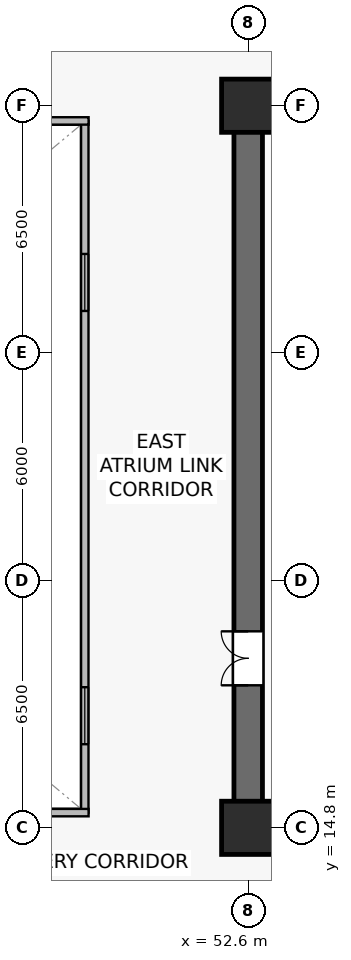
"""IFC4 building model, lengths in metres.
Left out: names, types, materials, properties, quantities, classifications, styles, units other than length and angle.
Written with IfcOpenShell. Run it as: python <this file> out.ifc"""

import sys

from ifc_helpers import new_model, si_unit, direction, frame, frame_2d, origin, origin_2d, place, context, subcontext, project, spatial, rectangle, extrude, source, transform, mapped, element, fill, save


model = new_model("IFC4")
c1 = context("Model", 3, precision=1e-05, world=origin(), true_north=direction((0.0, 1.0)))
c2 = subcontext(c1, "Body", "Model", "MODEL_VIEW")
j1 = project(units=[si_unit("LENGTHUNIT", "METRE"), si_unit("PLANEANGLEUNIT", "RADIAN")], contexts=[c1])
p1 = place(None, origin())
s1 = spatial("IfcSite", under=j1, at=p1, CompositionType="ELEMENT")
p2 = place(p1, origin())
s2 = spatial("IfcBuilding", under=s1, at=p2, CompositionType="ELEMENT")
p3 = place(p2, frame((0.0, 0.0, 90.8)))
s3 = spatial("IfcBuildingStorey", under=s2, at=p3, CompositionType="ELEMENT", Elevation=90.8)
p4 = place(p3, frame((52.225, 14.8, 0.0), z_axis=(0.0, 0.0, 1.0), x_axis=(1.0, 0.0, 0.0)))
e1 = element("IfcWall", 1, at=p4, inside=s3, PredefinedType="SHEAR", context=c2, shape_type="SweptSolid", body=[
    extrude(rectangle(XDim=15.55, YDim=0.75, at=frame_2d((7.775, 0.0))), origin(), (0.0, 0.0, 1.0), 3.78),
])
p5 = place(p3, frame((52.225, 33.8, 0.0), z_axis=(0.0, 0.0, 1.0), x_axis=(1.0, 0.0, 0.0)))
e2 = element("IfcWall", 2, at=p5, inside=s3, PredefinedType="SHEAR", context=c2, shape_type="SweptSolid", body=[
    extrude(rectangle(XDim=15.55, YDim=0.75, at=frame_2d((7.775, 0.0))), origin(), (0.0, 0.0, 1.0), 3.78),
])
p6 = place(p5, frame((7.725, 0.0, 0.0)))
e3 = element("IfcOpeningElement", 3, at=p6, cuts=e2, PredefinedType="OPENING", context=c2, shape_type="SweptSolid", body=[
    extrude(rectangle(XDim=0.95, YDim=2.15, at=frame_2d((0.475, 1.075))), frame((0.0, 0.385, 0.0), z_axis=(0.0, -1.0, 0.0), x_axis=(1.0, 0.0, 0.0)), (0.0, 0.0, 1.0), 0.77),
])
p7 = place(p5, frame((2.66, 0.0, 0.0)))
e4 = element("IfcOpeningElement", 4, at=p7, cuts=e2, PredefinedType="OPENING", context=c2, shape_type="SweptSolid", body=[
    extrude(rectangle(XDim=0.95, YDim=2.15, at=frame_2d((0.475, 1.075))), frame((0.0, 0.385, 0.0), z_axis=(0.0, -1.0, 0.0), x_axis=(1.0, 0.0, 0.0)), (0.0, 0.0, 1.0), 0.77),
])
p8 = place(p3, frame((52.6, 15.175, 0.0), z_axis=(0.0, 0.0, 1.0), x_axis=(0.0, 1.0, 0.0)))
e5 = element("IfcWall", 5, at=p8, inside=s3, PredefinedType="SHEAR", context=c2, shape_type="SweptSolid", body=[
    extrude(rectangle(XDim=18.25, YDim=0.75, at=frame_2d((9.125, 0.0))), origin(), (0.0, 0.0, 1.0), 3.78),
])
p9 = place(p8, frame((3.375, 0.0, 0.0)))
e6 = element("IfcOpeningElement", 6, at=p9, cuts=e5, PredefinedType="OPENING", context=c2, shape_type="SweptSolid", body=[
    extrude(rectangle(XDim=1.42, YDim=2.2, at=frame_2d((0.71, 1.1))), frame((0.0, 0.385, 0.0), z_axis=(0.0, -1.0, 0.0), x_axis=(1.0, 0.0, 0.0)), (0.0, 0.0, 1.0), 0.77),
])
m1 = source(origin(), c2, "Body", "SweptSolid", [
    extrude(rectangle(XDim=1.4, YDim=1.4, at=origin_2d()), origin(), (0.0, 0.0, 1.0), 4.1),
])
for number, where, z_axis, x_axis in (
    (7, (52.6, 14.8, 0.0), (0.0, 0.0, 1.0), (1.0, 0.0, 0.0)),
    (8, (52.6, 33.8, 0.0), (0.0, 0.0, 1.0), (1.0, 0.0, 0.0)),
):
    element("IfcColumn", number, at=place(p3, frame(where, z_axis=z_axis, x_axis=x_axis)), inside=s3, PredefinedType="COLUMN", context=c2, shape_type="MappedRepresentation", body=[
        mapped(m1, transform((0.0, 0.0, 0.0), scale=1.0)),
    ])
p10 = place(p3, frame((48.3, 15.2, 0.0), z_axis=(0.0, 0.0, 1.0), x_axis=(0.0, 1.0, 0.0)))
e9 = element("IfcWall", 9, at=p10, inside=s3, PredefinedType="SOLIDWALL", context=c2, shape_type="SweptSolid", body=[
    extrude(rectangle(XDim=18.2, YDim=0.195, at=frame_2d((9.1, 0.0))), origin(), (0.0, 0.0, 1.0), 3.78),
])
p11 = place(p10, frame((1.8, 0.0, 0.9)))
e10 = element("IfcOpeningElement", 10, at=p11, cuts=e9, PredefinedType="OPENING", context=c2, shape_type="SweptSolid", body=[
    extrude(rectangle(XDim=1.5, YDim=1.4, at=frame_2d((0.75, 0.7))), frame((0.0, 0.107, 0.0), z_axis=(0.0, -1.0, 0.0), x_axis=(1.0, 0.0, 0.0)), (0.0, 0.0, 1.0), 0.215),
])
p12 = place(p10, frame((13.2, 0.0, 0.9)))
e11 = element("IfcOpeningElement", 11, at=p12, cuts=e9, PredefinedType="OPENING", context=c2, shape_type="SweptSolid", body=[
    extrude(rectangle(XDim=1.5, YDim=1.4, at=frame_2d((0.75, 0.7))), frame((0.0, 0.107, 0.0), z_axis=(0.0, -1.0, 0.0), x_axis=(1.0, 0.0, 0.0)), (0.0, 0.0, 1.0), 0.215),
])
for number, where, z_axis, x_axis in (
    (12, (26.4, 15.2, 0.0), (0.0, 0.0, 1.0), (1.0, 0.0, 0.0)),
    (13, (26.4, 33.4, 0.0), (0.0, 0.0, 1.0), (1.0, 0.0, 0.0)),
):
    element("IfcWall", number, at=place(p3, frame(where, z_axis=z_axis, x_axis=x_axis)), inside=s3, PredefinedType="SOLIDWALL", context=c2, shape_type="SweptSolid", body=[
        extrude(rectangle(XDim=22.0, YDim=0.195, at=frame_2d((11.0, 0.0))), origin(), (0.0, 0.0, 1.0), 3.78),
    ])
m2 = source(origin(), c2, "Body", "SweptSolid", [
    extrude(rectangle(XDim=1.5, YDim=1.4, at=frame_2d((0.75, 0.7))), frame((0.0, 0.03, 0.0), z_axis=(0.0, -1.0, 0.0), x_axis=(1.0, 0.0, 0.0)), (0.0, 0.0, 1.0), 0.06),
])
p13 = place(p11, origin())
e14 = element("IfcWindow", 14, at=p13, inside=s3, PartitioningType="SINGLE_PANEL", PredefinedType="WINDOW", context=c2, shape_type="MappedRepresentation", body=[
    mapped(m2, transform((0.0, 0.0, 0.0), scale=1.0)),
])
fill(e10, e14)
p14 = place(p12, origin())
e15 = element("IfcWindow", 15, at=p14, inside=s3, PartitioningType="SINGLE_PANEL", PredefinedType="WINDOW", context=c2, shape_type="MappedRepresentation", body=[
    mapped(m2, transform((0.0, 0.0, 0.0), scale=1.0)),
])
fill(e11, e15)
m3 = source(origin(), c2, "Body", "SweptSolid", [
    extrude(rectangle(XDim=1.42, YDim=2.2, at=frame_2d((0.71, 1.1))), frame((0.0, 0.025, 0.0), z_axis=(0.0, -1.0, 0.0), x_axis=(1.0, 0.0, 0.0)), (0.0, 0.0, 1.0), 0.05),
])
p15 = place(p9, origin())
e16 = element("IfcDoor", 16, at=p15, inside=s3, OperationType="DOUBLE_DOOR_SINGLE_SWING", PredefinedType="DOOR", context=c2, shape_type="MappedRepresentation", body=[
    mapped(m3, transform((0.0, 0.0, 0.0), scale=1.0)),
])
fill(e6, e16)
save(model, sys.argv[1])
